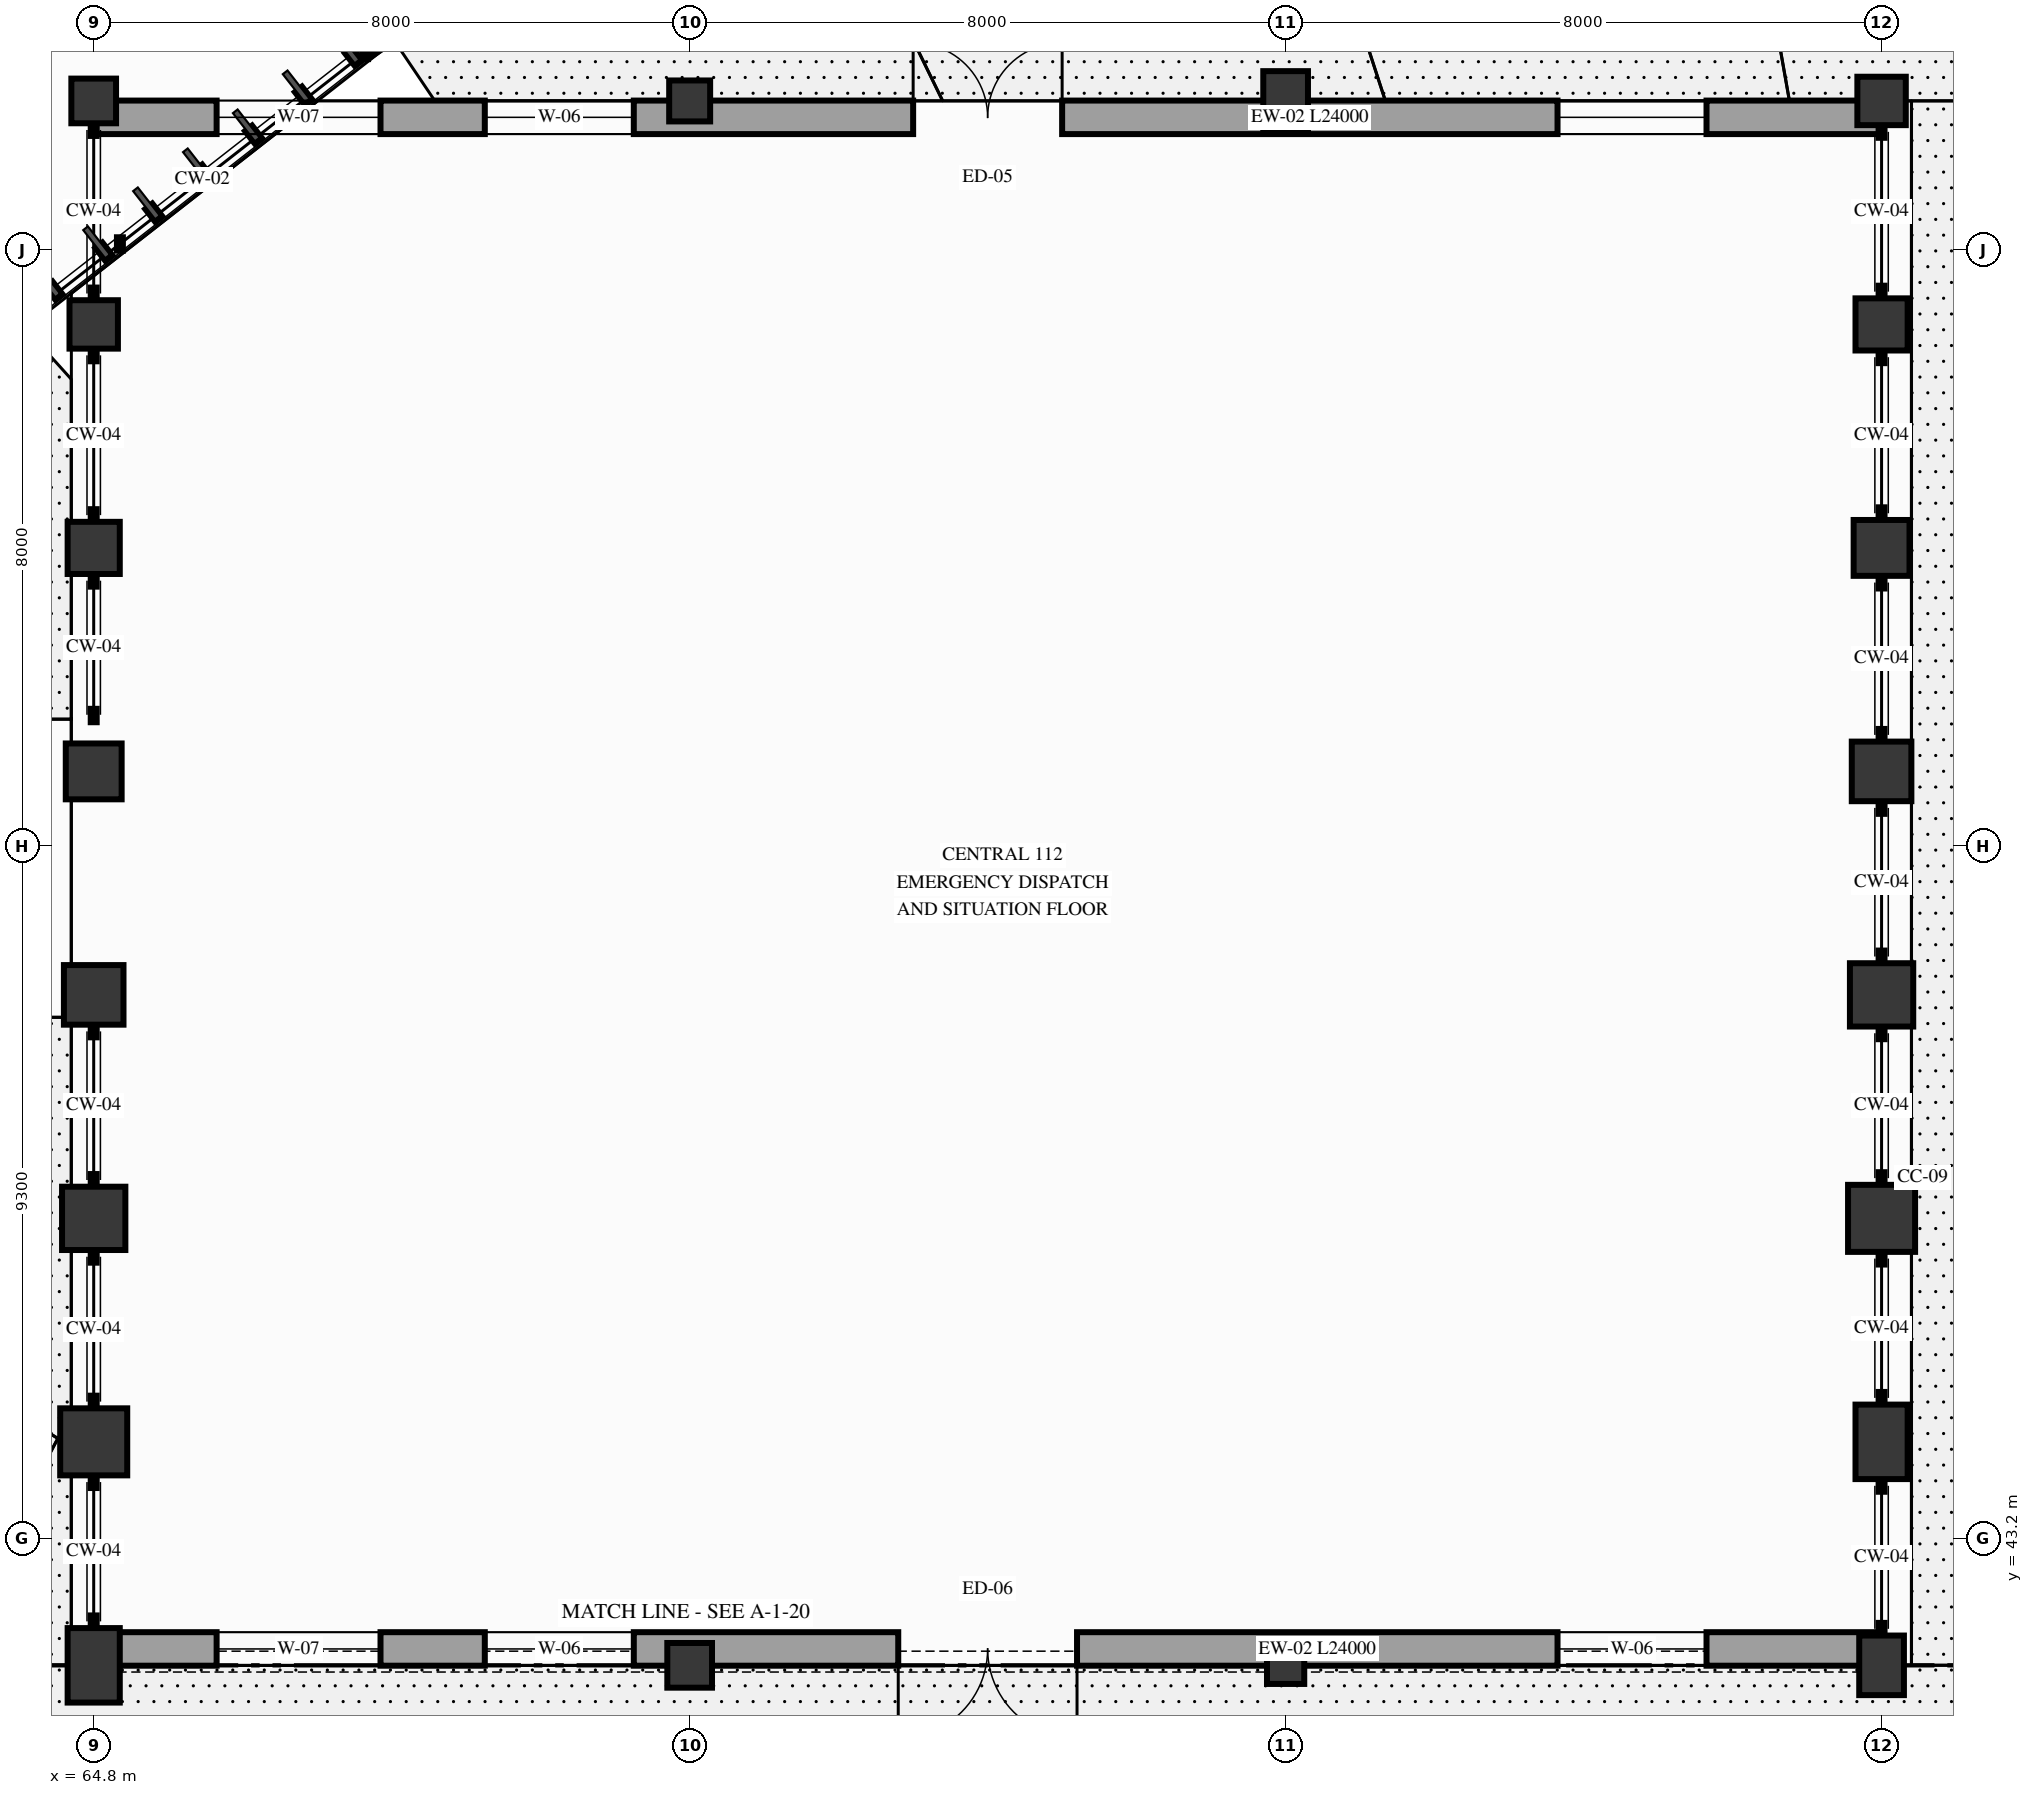
"""IFC4 building model, lengths in metres.
Left out: names, types, materials, properties, quantities, classifications, styles, units other than length and angle.
Written with IfcOpenShell. Run it as: python <this file> out.ifc"""

import sys

from ifc_helpers import new_model, si_unit, direction, frame, frame_2d, origin, origin_2d, place, context, subcontext, project, spatial, rectangle, extrude, element, fill, save


model = new_model("IFC4")
c1 = context("Model", 3, precision=1e-05, world=origin(), true_north=direction((0.0, 1.0)))
c2 = subcontext(c1, "Body", "Model", "MODEL_VIEW")
j1 = project(units=[si_unit("LENGTHUNIT", "METRE"), si_unit("PLANEANGLEUNIT", "RADIAN")], contexts=[c1])
p1 = place(None, origin())
s1 = spatial("IfcSite", under=j1, at=p1, CompositionType="ELEMENT")
p2 = place(p1, origin())
s2 = spatial("IfcBuilding", under=s1, at=p2, CompositionType="ELEMENT")
p3 = place(p2, origin())
s3 = spatial("IfcBuildingStorey", under=s2, at=p3, CompositionType="ELEMENT", Elevation=0.0)
p4 = place(p3, frame((68.641, 63.597, 0.0), z_axis=(0.0, 0.0, 1.0), x_axis=(0.829037572555, 0.559192903471, 0.0)))
e1 = element("IfcColumn", 1, at=p4, inside=s3, PredefinedType="COLUMN", context=c2, shape_type="SweptSolid", body=[
    extrude(rectangle(XDim=0.7, YDim=0.7, at=origin_2d()), origin(), (0.0, 0.0, 1.0), 5.1),
])
p5 = place(p3, frame((88.8, 41.5, 0.0), z_axis=(0.0, 0.0, 1.0), x_axis=(1.0, 0.0, 0.0)))
e2 = element("IfcColumn", 2, at=p5, inside=s3, PredefinedType="COLUMN", context=c2, shape_type="SweptSolid", body=[
    extrude(rectangle(XDim=0.6, YDim=0.8, at=origin_2d()), origin(), (0.0, 0.0, 1.0), 5.1),
])
p6 = place(p3, frame((88.8, 44.5, 0.0), z_axis=(0.0, 0.0, 1.0), x_axis=(1.0, 0.0, 0.0)))
e3 = element("IfcColumn", 3, at=p6, inside=s3, PredefinedType="COLUMN", context=c2, shape_type="SweptSolid", body=[
    extrude(rectangle(XDim=0.7, YDim=1.0, at=origin_2d()), origin(), (0.0, 0.0, 1.0), 5.1),
])
p7 = place(p3, frame((88.8, 47.5, 0.0), z_axis=(0.0, 0.0, 1.0), x_axis=(1.0, 0.0, 0.0)))
e4 = element("IfcColumn", 4, at=p7, inside=s3, PredefinedType="COLUMN", context=c2, shape_type="SweptSolid", body=[
    extrude(rectangle(XDim=0.9, YDim=0.9, at=origin_2d()), origin(), (0.0, 0.0, 1.0), 5.1),
])
p8 = place(p3, frame((88.8, 50.5, 0.0), z_axis=(0.0, 0.0, 1.0), x_axis=(1.0, 0.0, 0.0)))
e5 = element("IfcColumn", 5, at=p8, inside=s3, PredefinedType="COLUMN", context=c2, shape_type="SweptSolid", body=[
    extrude(rectangle(XDim=0.85, YDim=0.85, at=origin_2d()), origin(), (0.0, 0.0, 1.0), 5.1),
])
p9 = place(p3, frame((88.8, 53.5, 0.0), z_axis=(0.0, 0.0, 1.0), x_axis=(1.0, 0.0, 0.0)))
e6 = element("IfcColumn", 6, at=p9, inside=s3, PredefinedType="COLUMN", context=c2, shape_type="SweptSolid", body=[
    extrude(rectangle(XDim=0.8, YDim=0.8, at=origin_2d()), origin(), (0.0, 0.0, 1.0), 5.1),
])
p10 = place(p3, frame((88.8, 56.5, 0.0), z_axis=(0.0, 0.0, 1.0), x_axis=(1.0, 0.0, 0.0)))
e7 = element("IfcColumn", 7, at=p10, inside=s3, PredefinedType="COLUMN", context=c2, shape_type="SweptSolid", body=[
    extrude(rectangle(XDim=0.75, YDim=0.75, at=origin_2d()), origin(), (0.0, 0.0, 1.0), 5.1),
])
p11 = place(p3, frame((88.8, 59.5, 0.0), z_axis=(0.0, 0.0, 1.0), x_axis=(1.0, 0.0, 0.0)))
e8 = element("IfcColumn", 8, at=p11, inside=s3, PredefinedType="COLUMN", context=c2, shape_type="SweptSolid", body=[
    extrude(rectangle(XDim=0.7, YDim=0.7, at=origin_2d()), origin(), (0.0, 0.0, 1.0), 5.1),
])
p12 = place(p3, frame((88.8, 62.5, 0.0), z_axis=(0.0, 0.0, 1.0), x_axis=(1.0, 0.0, 0.0)))
e9 = element("IfcColumn", 9, at=p12, inside=s3, PredefinedType="COLUMN", context=c2, shape_type="SweptSolid", body=[
    extrude(rectangle(XDim=0.65, YDim=0.65, at=origin_2d()), origin(), (0.0, 0.0, 1.0), 5.1),
])
p13 = place(p3, frame((72.8, 41.5, 0.0), z_axis=(0.0, 0.0, 1.0), x_axis=(1.0, 0.0, 0.0)))
e10 = element("IfcColumn", 10, at=p13, inside=s3, PredefinedType="COLUMN", context=c2, shape_type="SweptSolid", body=[
    extrude(rectangle(XDim=0.6, YDim=0.6, at=origin_2d()), origin(), (0.0, 0.0, 1.0), 4.84),
])
p14 = place(p3, frame((72.8, 62.5, 0.0), z_axis=(0.0, 0.0, 1.0), x_axis=(1.0, 0.0, 0.0)))
e11 = element("IfcColumn", 11, at=p14, inside=s3, PredefinedType="COLUMN", context=c2, shape_type="SweptSolid", body=[
    extrude(rectangle(XDim=0.55, YDim=0.55, at=origin_2d()), origin(), (0.0, 0.0, 1.0), 4.84),
])
p15 = place(p3, frame((80.8, 41.5, 0.0), z_axis=(0.0, 0.0, 1.0), x_axis=(1.0, 0.0, 0.0)))
e12 = element("IfcColumn", 12, at=p15, inside=s3, PredefinedType="COLUMN", context=c2, shape_type="SweptSolid", body=[
    extrude(rectangle(XDim=0.5, YDim=0.5, at=origin_2d()), origin(), (0.0, 0.0, 1.0), 4.84),
])
p16 = place(p3, frame((80.8, 62.5, 0.0), z_axis=(0.0, 0.0, 1.0), x_axis=(1.0, 0.0, 0.0)))
e13 = element("IfcColumn", 13, at=p16, inside=s3, PredefinedType="COLUMN", context=c2, shape_type="SweptSolid", body=[
    extrude(rectangle(XDim=0.6, YDim=0.8, at=origin_2d()), origin(), (0.0, 0.0, 1.0), 4.84),
])
p17 = place(p3, frame((64.8, 41.5, 0.0), z_axis=(0.0, 0.0, 1.0), x_axis=(1.0, 0.0, 0.0)))
e14 = element("IfcColumn", 14, at=p17, inside=s3, PredefinedType="COLUMN", context=c2, shape_type="SweptSolid", body=[
    extrude(rectangle(XDim=0.7, YDim=1.0, at=origin_2d()), origin(), (0.0, 0.0, 1.0), 5.1),
])
p18 = place(p3, frame((64.8, 44.5, 0.0), z_axis=(0.0, 0.0, 1.0), x_axis=(1.0, 0.0, 0.0)))
e15 = element("IfcColumn", 15, at=p18, inside=s3, PredefinedType="COLUMN", context=c2, shape_type="SweptSolid", body=[
    extrude(rectangle(XDim=0.9, YDim=0.9, at=origin_2d()), origin(), (0.0, 0.0, 1.0), 5.1),
])
p19 = place(p3, frame((64.8, 47.5, 0.0), z_axis=(0.0, 0.0, 1.0), x_axis=(1.0, 0.0, 0.0)))
e16 = element("IfcColumn", 16, at=p19, inside=s3, PredefinedType="COLUMN", context=c2, shape_type="SweptSolid", body=[
    extrude(rectangle(XDim=0.85, YDim=0.85, at=origin_2d()), origin(), (0.0, 0.0, 1.0), 5.1),
])
p20 = place(p3, frame((64.8, 50.5, 0.0), z_axis=(0.0, 0.0, 1.0), x_axis=(1.0, 0.0, 0.0)))
e17 = element("IfcColumn", 17, at=p20, inside=s3, PredefinedType="COLUMN", context=c2, shape_type="SweptSolid", body=[
    extrude(rectangle(XDim=0.8, YDim=0.8, at=origin_2d()), origin(), (0.0, 0.0, 1.0), 5.1),
])
p21 = place(p3, frame((64.8, 53.5, 0.0), z_axis=(0.0, 0.0, 1.0), x_axis=(1.0, 0.0, 0.0)))
e18 = element("IfcColumn", 18, at=p21, inside=s3, PredefinedType="COLUMN", context=c2, shape_type="SweptSolid", body=[
    extrude(rectangle(XDim=0.75, YDim=0.75, at=origin_2d()), origin(), (0.0, 0.0, 1.0), 5.1),
])
p22 = place(p3, frame((64.8, 56.5, 0.0), z_axis=(0.0, 0.0, 1.0), x_axis=(1.0, 0.0, 0.0)))
e19 = element("IfcColumn", 19, at=p22, inside=s3, PredefinedType="COLUMN", context=c2, shape_type="SweptSolid", body=[
    extrude(rectangle(XDim=0.7, YDim=0.7, at=origin_2d()), origin(), (0.0, 0.0, 1.0), 5.1),
])
p23 = place(p3, frame((64.8, 59.5, 0.0), z_axis=(0.0, 0.0, 1.0), x_axis=(1.0, 0.0, 0.0)))
e20 = element("IfcColumn", 20, at=p23, inside=s3, PredefinedType="COLUMN", context=c2, shape_type="SweptSolid", body=[
    extrude(rectangle(XDim=0.65, YDim=0.65, at=origin_2d()), origin(), (0.0, 0.0, 1.0), 5.1),
])
p24 = place(p3, frame((64.8, 62.5, 0.0), z_axis=(0.0, 0.0, 1.0), x_axis=(1.0, 0.0, 0.0)))
e21 = element("IfcColumn", 21, at=p24, inside=s3, PredefinedType="COLUMN", context=c2, shape_type="SweptSolid", body=[
    extrude(rectangle(XDim=0.6, YDim=0.6, at=origin_2d()), origin(), (0.0, 0.0, 1.0), 5.1),
])
p25 = place(p3, frame((64.8, 41.72, 0.0), z_axis=(0.0, 0.0, 1.0), x_axis=(1.0, 0.0, 0.0)))
e22 = element("IfcWall", 22, at=p25, inside=s3, PredefinedType="SOLIDWALL", context=c2, shape_type="SweptSolid", body=[
    extrude(rectangle(XDim=24.0, YDim=0.45, at=frame_2d((12.0, 0.0))), origin(), (0.0, 0.0, 1.0), 4.518),
])
p26 = place(p25, frame((13.2, 0.0, 0.0), z_axis=(0.0, 0.0, 1.0), x_axis=(-1.0, 0.0, 0.0)))
e23 = element("IfcOpeningElement", 23, at=p26, cuts=e22, PredefinedType="OPENING", context=c2, shape_type="SweptSolid", body=[
    extrude(rectangle(XDim=2.4, YDim=2.7, at=frame_2d((1.2, 1.35))), frame((0.0, 0.235, 0.0), z_axis=(0.0, -1.0, 0.0), x_axis=(1.0, 0.0, 0.0)), (0.0, 0.0, 1.0), 0.47),
])
p27 = place(p25, frame((1.65, 0.0, 0.6)))
e24 = element("IfcOpeningElement", 24, at=p27, cuts=e22, PredefinedType="OPENING", context=c2, shape_type="SweptSolid", body=[
    extrude(rectangle(XDim=2.2, YDim=2.6, at=frame_2d((1.1, 1.3))), frame((0.0, 0.235, 0.0), z_axis=(0.0, -1.0, 0.0), x_axis=(1.0, 0.0, 0.0)), (0.0, 0.0, 1.0), 0.47),
])
p28 = place(p25, frame((5.25, 0.0, 0.6)))
e25 = element("IfcOpeningElement", 25, at=p28, cuts=e22, PredefinedType="OPENING", context=c2, shape_type="SweptSolid", body=[
    extrude(rectangle(XDim=2.0, YDim=2.5, at=frame_2d((1.0, 1.25))), frame((0.0, 0.235, 0.0), z_axis=(0.0, -1.0, 0.0), x_axis=(1.0, 0.0, 0.0)), (0.0, 0.0, 1.0), 0.47),
])
p29 = place(p25, frame((19.65, 0.0, 0.6)))
e26 = element("IfcOpeningElement", 26, at=p29, cuts=e22, PredefinedType="OPENING", context=c2, shape_type="SweptSolid", body=[
    extrude(rectangle(XDim=2.0, YDim=2.5, at=frame_2d((1.0, 1.25))), frame((0.0, 0.235, 0.0), z_axis=(0.0, -1.0, 0.0), x_axis=(1.0, 0.0, 0.0)), (0.0, 0.0, 1.0), 0.47),
])
p30 = place(p3, frame((64.8, 62.28, 0.0), z_axis=(0.0, 0.0, 1.0), x_axis=(1.0, 0.0, 0.0)))
e27 = element("IfcWall", 27, at=p30, inside=s3, PredefinedType="SOLIDWALL", context=c2, shape_type="SweptSolid", body=[
    extrude(rectangle(XDim=24.0, YDim=0.45, at=frame_2d((12.0, 0.0))), origin(), (0.0, 0.0, 1.0), 4.518),
])
p31 = place(p30, frame((11.0, 0.0, 0.0)))
e28 = element("IfcOpeningElement", 28, at=p31, cuts=e27, PredefinedType="OPENING", context=c2, shape_type="SweptSolid", body=[
    extrude(rectangle(XDim=2.0, YDim=2.5, at=frame_2d((1.0, 1.25))), frame((0.0, 0.235, 0.0), z_axis=(0.0, -1.0, 0.0), x_axis=(1.0, 0.0, 0.0)), (0.0, 0.0, 1.0), 0.47),
])
p32 = place(p30, frame((1.65, 0.0, 0.6)))
e29 = element("IfcOpeningElement", 29, at=p32, cuts=e27, PredefinedType="OPENING", context=c2, shape_type="SweptSolid", body=[
    extrude(rectangle(XDim=2.2, YDim=2.6, at=frame_2d((1.1, 1.3))), frame((0.0, 0.235, 0.0), z_axis=(0.0, -1.0, 0.0), x_axis=(1.0, 0.0, 0.0)), (0.0, 0.0, 1.0), 0.47),
])
p33 = place(p30, frame((5.25, 0.0, 0.6)))
e30 = element("IfcOpeningElement", 30, at=p33, cuts=e27, PredefinedType="OPENING", context=c2, shape_type="SweptSolid", body=[
    extrude(rectangle(XDim=2.0, YDim=2.5, at=frame_2d((1.0, 1.25))), frame((0.0, 0.235, 0.0), z_axis=(0.0, -1.0, 0.0), x_axis=(1.0, 0.0, 0.0)), (0.0, 0.0, 1.0), 0.47),
])
p34 = place(p30, frame((19.65, 0.0, 0.6)))
e31 = element("IfcOpeningElement", 31, at=p34, cuts=e27, PredefinedType="OPENING", context=c2, shape_type="SweptSolid", body=[
    extrude(rectangle(XDim=2.0, YDim=2.5, at=frame_2d((1.0, 1.25))), frame((0.0, 0.235, 0.0), z_axis=(0.0, -1.0, 0.0), x_axis=(1.0, 0.0, 0.0)), (0.0, 0.0, 1.0), 0.47),
])
p35 = place(p26, origin())
e32 = element("IfcDoor", 32, at=p35, inside=s3, OperationType="DOUBLE_DOOR_SINGLE_SWING", PredefinedType="DOOR", context=c2, shape_type="SweptSolid", body=[
    extrude(rectangle(XDim=2.4, YDim=2.7, at=frame_2d((1.2, 1.35))), frame((0.0, 0.025, 0.0), z_axis=(0.0, -1.0, 0.0), x_axis=(1.0, 0.0, 0.0)), (0.0, 0.0, 1.0), 0.05),
])
fill(e23, e32)
p36 = place(p31, origin())
e33 = element("IfcDoor", 33, at=p36, inside=s3, OperationType="DOUBLE_DOOR_SINGLE_SWING", PredefinedType="DOOR", context=c2, shape_type="SweptSolid", body=[
    extrude(rectangle(XDim=2.0, YDim=2.5, at=frame_2d((1.0, 1.25))), frame((0.0, 0.025, 0.0), z_axis=(0.0, -1.0, 0.0), x_axis=(1.0, 0.0, 0.0)), (0.0, 0.0, 1.0), 0.05),
])
fill(e28, e33)
p37 = place(p27, origin())
e34 = element("IfcWindow", 34, at=p37, inside=s3, PartitioningType="SINGLE_PANEL", PredefinedType="WINDOW", context=c2, shape_type="SweptSolid", body=[
    extrude(rectangle(XDim=2.2, YDim=2.6, at=frame_2d((1.1, 1.3))), frame((0.0, 0.03, 0.0), z_axis=(0.0, -1.0, 0.0), x_axis=(1.0, 0.0, 0.0)), (0.0, 0.0, 1.0), 0.06),
])
fill(e24, e34)
p38 = place(p28, origin())
e35 = element("IfcWindow", 35, at=p38, inside=s3, PartitioningType="SINGLE_PANEL", PredefinedType="WINDOW", context=c2, shape_type="SweptSolid", body=[
    extrude(rectangle(XDim=2.0, YDim=2.5, at=frame_2d((1.0, 1.25))), frame((0.0, 0.03, 0.0), z_axis=(0.0, -1.0, 0.0), x_axis=(1.0, 0.0, 0.0)), (0.0, 0.0, 1.0), 0.06),
])
fill(e25, e35)
p39 = place(p29, origin())
e36 = element("IfcWindow", 36, at=p39, inside=s3, PartitioningType="SINGLE_PANEL", PredefinedType="WINDOW", context=c2, shape_type="SweptSolid", body=[
    extrude(rectangle(XDim=2.0, YDim=2.5, at=frame_2d((1.0, 1.25))), frame((0.0, 0.03, 0.0), z_axis=(0.0, -1.0, 0.0), x_axis=(1.0, 0.0, 0.0)), (0.0, 0.0, 1.0), 0.06),
])
fill(e26, e36)
p40 = place(p32, origin())
e37 = element("IfcWindow", 37, at=p40, inside=s3, PartitioningType="SINGLE_PANEL", PredefinedType="WINDOW", context=c2, shape_type="SweptSolid", body=[
    extrude(rectangle(XDim=2.2, YDim=2.6, at=frame_2d((1.1, 1.3))), frame((0.0, 0.03, 0.0), z_axis=(0.0, -1.0, 0.0), x_axis=(1.0, 0.0, 0.0)), (0.0, 0.0, 1.0), 0.06),
])
fill(e29, e37)
p41 = place(p33, origin())
e38 = element("IfcWindow", 38, at=p41, inside=s3, PartitioningType="SINGLE_PANEL", PredefinedType="WINDOW", context=c2, shape_type="SweptSolid", body=[
    extrude(rectangle(XDim=2.0, YDim=2.5, at=frame_2d((1.0, 1.25))), frame((0.0, 0.03, 0.0), z_axis=(0.0, -1.0, 0.0), x_axis=(1.0, 0.0, 0.0)), (0.0, 0.0, 1.0), 0.06),
])
fill(e30, e38)
p42 = place(p34, origin())
e39 = element("IfcWindow", 39, at=p42, inside=s3, PartitioningType="SINGLE_PANEL", PredefinedType="WINDOW", context=c2, shape_type="SweptSolid", body=[
    extrude(rectangle(XDim=2.0, YDim=2.5, at=frame_2d((1.0, 1.25))), frame((0.0, 0.03, 0.0), z_axis=(0.0, -1.0, 0.0), x_axis=(1.0, 0.0, 0.0)), (0.0, 0.0, 1.0), 0.06),
])
fill(e31, e39)
save(model, sys.argv[1])
